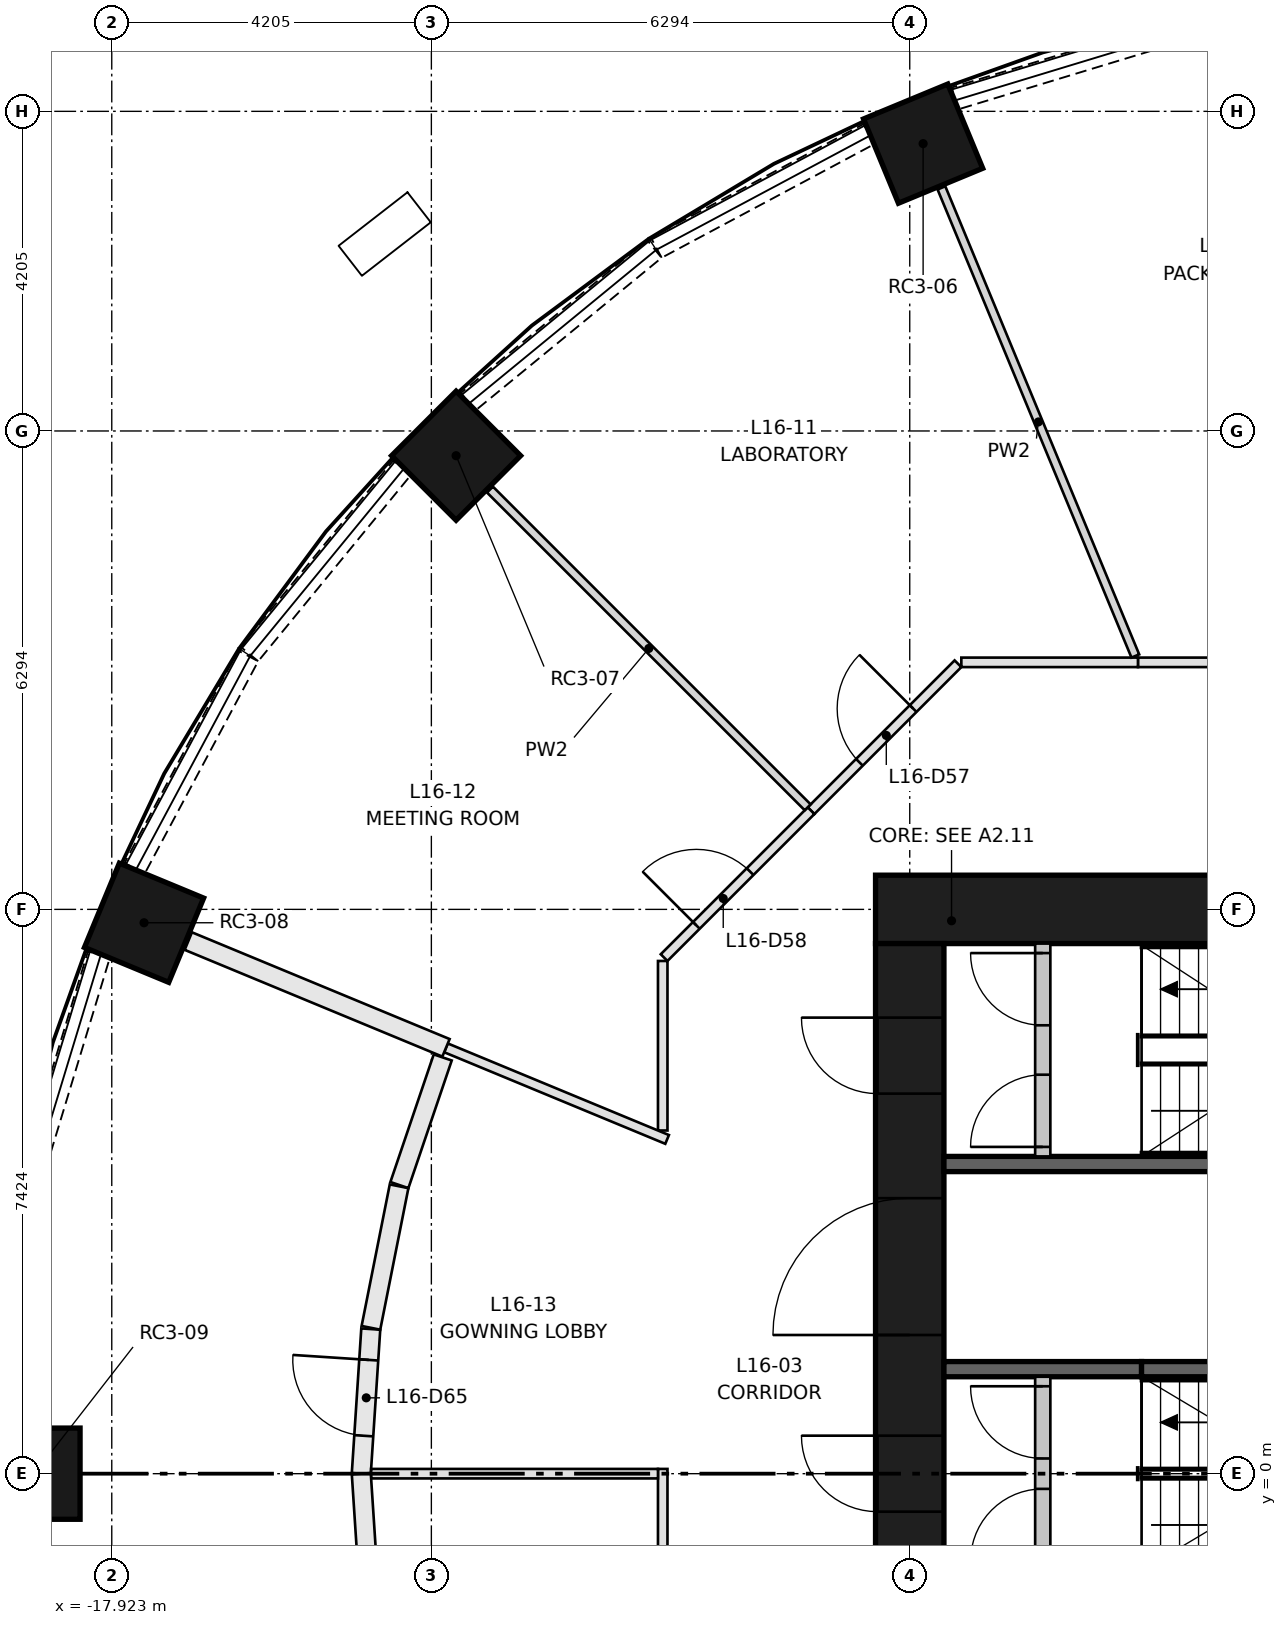
"""IFC4 building model, lengths in metres.
Left out: names, types, materials, properties, quantities, classifications, styles, units other than length and angle.
Written with IfcOpenShell. Run it as: python <this file> out.ifc"""

import sys

from ifc_helpers import new_model, si_unit, direction, frame, frame_2d, origin, origin_2d, place, context, subcontext, project, spatial, rectangle, extrude, element, fill, save


model = new_model("IFC4")
c1 = context("Model", 3, precision=1e-05, world=origin(), true_north=direction((0.0, 1.0)))
c2 = subcontext(c1, "Body", "Model", "MODEL_VIEW")
j1 = project(units=[si_unit("LENGTHUNIT", "METRE"), si_unit("PLANEANGLEUNIT", "RADIAN")], contexts=[c1])
p1 = place(None, origin())
s1 = spatial("IfcSite", under=j1, at=p1, CompositionType="ELEMENT")
p2 = place(p1, origin())
s2 = spatial("IfcBuilding", under=s1, at=p2, CompositionType="ELEMENT")
p3 = place(p2, frame((0.0, 0.0, 62.7)))
s3 = spatial("IfcBuildingStorey", under=s2, at=p3, CompositionType="ELEMENT", Elevation=62.7)
for number, where, z_axis, x_axis in (
    (1, (-7.248, 17.498, 0.0), (0.0, 0.0, 1.0), (-0.383, 0.924, 0.0)),
    (2, (-13.393, 13.393, 0.0), (0.0, 0.0, 1.0), (-0.707, 0.707, 0.0)),
    (3, (-17.498, 7.248, 0.0), (0.0, 0.0, 1.0), (-0.924, 0.383, 0.0)),
    (4, (-18.94, 0.0, 0.0), (0.0, 0.0, 1.0), (-1.0, 0.0, 0.0)),
):
    element("IfcColumn", number, at=place(p3, frame(where, z_axis=z_axis, x_axis=x_axis)), inside=s3, PredefinedType="COLUMN", context=c2, shape_type="SweptSolid", body=[
        extrude(rectangle(XDim=1.2, YDim=1.2, at=origin_2d()), origin(), (0.0, 0.0, 1.0), 3.65),
    ])
p4 = place(p3, frame((-7.874, 7.424, 0.0), z_axis=(0.0, 0.0, 1.0), x_axis=(1.0, 0.0, 0.0)))
e5 = element("IfcWall", 5, at=p4, inside=s3, PredefinedType="SHEAR", context=c2, shape_type="SweptSolid", body=[
    extrude(rectangle(XDim=15.748, YDim=0.9, at=frame_2d((7.874, 0.0))), origin(), (0.0, 0.0, 1.0), 3.65),
])
p5 = place(p3, frame((-7.424, -6.974, 0.0), z_axis=(0.0, 0.0, 1.0), x_axis=(0.0, 1.0, 0.0)))
e6 = element("IfcWall", 6, at=p5, inside=s3, PredefinedType="SHEAR", context=c2, shape_type="SweptSolid", body=[
    extrude(rectangle(XDim=13.948, YDim=0.9, at=frame_2d((6.974, 0.0))), origin(), (0.0, 0.0, 1.0), 3.65),
])
p6 = place(p5, frame((6.474, 0.0, 0.0)))
e7 = element("IfcOpeningElement", 7, at=p6, cuts=e6, PredefinedType="OPENING", context=c2, shape_type="SweptSolid", body=[
    extrude(rectangle(XDim=1.0, YDim=2.1, at=frame_2d((0.5, 1.05))), frame((0.0, 0.46, 0.0), z_axis=(0.0, -1.0, 0.0), x_axis=(1.0, 0.0, 0.0)), (0.0, 0.0, 1.0), 0.92),
])
p7 = place(p5, frame((3.35, 0.0, 0.0)))
e8 = element("IfcOpeningElement", 8, at=p7, cuts=e6, PredefinedType="OPENING", context=c2, shape_type="SweptSolid", body=[
    extrude(rectangle(XDim=1.8, YDim=2.1, at=frame_2d((0.9, 1.05))), frame((0.0, 0.46, 0.0), z_axis=(0.0, -1.0, 0.0), x_axis=(1.0, 0.0, 0.0)), (0.0, 0.0, 1.0), 0.92),
])
p8 = place(p5, frame((8.799, 0.0, 0.0)))
e9 = element("IfcOpeningElement", 9, at=p8, cuts=e6, PredefinedType="OPENING", context=c2, shape_type="SweptSolid", body=[
    extrude(rectangle(XDim=1.8, YDim=2.1, at=frame_2d((0.9, 1.05))), frame((0.0, 0.46, 0.0), z_axis=(0.0, -1.0, 0.0), x_axis=(1.0, 0.0, 0.0)), (0.0, 0.0, 1.0), 0.92),
])
p9 = place(p5, frame((11.974, 0.0, 0.0)))
e10 = element("IfcOpeningElement", 10, at=p9, cuts=e6, PredefinedType="OPENING", context=c2, shape_type="SweptSolid", body=[
    extrude(rectangle(XDim=1.0, YDim=2.1, at=frame_2d((0.5, 1.05))), frame((0.0, 0.46, 0.0), z_axis=(0.0, -1.0, 0.0), x_axis=(1.0, 0.0, 0.0)), (0.0, 0.0, 1.0), 0.92),
])
p10 = place(p3, frame((-6.974, 4.074, 0.0), z_axis=(0.0, 0.0, 1.0), x_axis=(1.0, 0.0, 0.0)))
e11 = element("IfcWall", 11, at=p10, inside=s3, PredefinedType="SHEAR", context=c2, shape_type="SweptSolid", body=[
    extrude(rectangle(XDim=6.974, YDim=0.2, at=frame_2d((3.487, 0.0))), origin(), (0.0, 0.0, 1.0), 3.3),
])
p11 = place(p3, frame((-6.974, 1.375, 0.0), z_axis=(0.0, 0.0, 1.0), x_axis=(1.0, 0.0, 0.0)))
e12 = element("IfcWall", 12, at=p11, inside=s3, PredefinedType="SHEAR", context=c2, shape_type="SweptSolid", body=[
    extrude(rectangle(XDim=2.6, YDim=0.2, at=frame_2d((1.3, 0.0))), origin(), (0.0, 0.0, 1.0), 3.3),
])
p12 = place(p3, frame((-4.374, 1.375, 0.0), z_axis=(0.0, 0.0, 1.0), x_axis=(1.0, 0.0, 0.0)))
e13 = element("IfcWall", 13, at=p12, inside=s3, PredefinedType="SHEAR", context=c2, shape_type="SweptSolid", body=[
    extrude(rectangle(XDim=4.374, YDim=0.2, at=frame_2d((2.187, 0.0))), origin(), (0.0, 0.0, 1.0), 3.3),
])
p13 = place(p3, frame((-5.674, -1.275, 0.0), z_axis=(0.0, 0.0, 1.0), x_axis=(0.0, 1.0, 0.0)))
e14 = element("IfcWall", 14, at=p13, inside=s3, PredefinedType="PARTITIONING", context=c2, shape_type="SweptSolid", body=[
    extrude(rectangle(XDim=2.55, YDim=0.2, at=frame_2d((1.275, 0.0))), origin(), (0.0, 0.0, 1.0), 3.3),
])
p14 = place(p13, frame((0.125, 0.0, 0.0)))
e15 = element("IfcOpeningElement", 15, at=p14, cuts=e14, PredefinedType="OPENING", context=c2, shape_type="SweptSolid", body=[
    extrude(rectangle(XDim=0.95, YDim=2.1, at=frame_2d((0.475, 1.05))), frame((0.0, 0.11, 0.0), z_axis=(0.0, -1.0, 0.0), x_axis=(1.0, 0.0, 0.0)), (0.0, 0.0, 1.0), 0.22),
])
p15 = place(p13, frame((1.475, 0.0, 0.0)))
e16 = element("IfcOpeningElement", 16, at=p15, cuts=e14, PredefinedType="OPENING", context=c2, shape_type="SweptSolid", body=[
    extrude(rectangle(XDim=0.95, YDim=2.1, at=frame_2d((0.475, 1.05))), frame((0.0, 0.11, 0.0), z_axis=(0.0, -1.0, 0.0), x_axis=(1.0, 0.0, 0.0)), (0.0, 0.0, 1.0), 0.22),
])
p16 = place(p3, frame((-5.674, 4.174, 0.0), z_axis=(0.0, 0.0, 1.0), x_axis=(0.0, 1.0, 0.0)))
e17 = element("IfcWall", 17, at=p16, inside=s3, PredefinedType="PARTITIONING", context=c2, shape_type="SweptSolid", body=[
    extrude(rectangle(XDim=2.8, YDim=0.2, at=frame_2d((1.4, 0.0))), origin(), (0.0, 0.0, 1.0), 3.3),
])
p17 = place(p16, frame((0.125, 0.0, 0.0)))
e18 = element("IfcOpeningElement", 18, at=p17, cuts=e17, PredefinedType="OPENING", context=c2, shape_type="SweptSolid", body=[
    extrude(rectangle(XDim=0.95, YDim=2.1, at=frame_2d((0.475, 1.05))), frame((0.0, 0.11, 0.0), z_axis=(0.0, -1.0, 0.0), x_axis=(1.0, 0.0, 0.0)), (0.0, 0.0, 1.0), 0.22),
])
p18 = place(p16, frame((1.725, 0.0, 0.0)))
e19 = element("IfcOpeningElement", 19, at=p18, cuts=e17, PredefinedType="OPENING", context=c2, shape_type="SweptSolid", body=[
    extrude(rectangle(XDim=0.95, YDim=2.1, at=frame_2d((0.475, 1.05))), frame((0.0, 0.11, 0.0), z_axis=(0.0, -1.0, 0.0), x_axis=(1.0, 0.0, 0.0)), (0.0, 0.0, 1.0), 0.22),
])
p19 = place(p3, frame((-3.797, 19.013, 0.0), z_axis=(0.0, 0.0, 1.0), x_axis=(-0.956888224489, -0.290456409527, 0.0)))
e20 = element("IfcWall", 20, at=p19, inside=s3, PredefinedType="SOLIDWALL", context=c2, shape_type="SweptSolid", body=[
    extrude(rectangle(XDim=3.169, YDim=0.3, at=frame_2d((1.584, 0.0))), origin(), (0.0, 0.0, 1.0), 0.9),
])
p20 = place(p3, frame((-7.963, 17.623, 0.0), z_axis=(0.0, 0.0, 1.0), x_axis=(-0.882007292685, -0.47123575379, 0.0)))
e21 = element("IfcWall", 21, at=p20, inside=s3, PredefinedType="SOLIDWALL", context=c2, shape_type="SweptSolid", body=[
    extrude(rectangle(XDim=3.17, YDim=0.3, at=frame_2d((1.585, 0.0))), origin(), (0.0, 0.0, 1.0), 0.9),
])
for number, where, z_axis, x_axis in (
    (22, (-10.784, 16.113, 0.0), (0.0, 0.0, 1.0), (-0.773, -0.634, 0.0)),
    (23, (-14.103, 13.234, 0.0), (0.0, 0.0, 1.0), (-0.634, -0.773, 0.0)),
):
    element("IfcWall", number, at=place(p3, frame(where, z_axis=z_axis, x_axis=x_axis)), inside=s3, PredefinedType="SOLIDWALL", context=c2, shape_type="SweptSolid", body=[
        extrude(rectangle(XDim=3.169, YDim=0.3, at=frame_2d((1.585, 0.0))), origin(), (0.0, 0.0, 1.0), 0.9),
    ])
p21 = place(p3, frame((-16.129, 10.759, 0.0), z_axis=(0.0, 0.0, 1.0), x_axis=(-0.47123575379, -0.882007292685, 0.0)))
e24 = element("IfcWall", 24, at=p21, inside=s3, PredefinedType="SOLIDWALL", context=c2, shape_type="SweptSolid", body=[
    extrude(rectangle(XDim=3.17, YDim=0.3, at=frame_2d((1.585, 0.0))), origin(), (0.0, 0.0, 1.0), 0.9),
])
p22 = place(p3, frame((-18.092, 6.83, 0.0), z_axis=(0.0, 0.0, 1.0), x_axis=(-0.290456409527, -0.956888224489, 0.0)))
e25 = element("IfcWall", 25, at=p22, inside=s3, PredefinedType="SOLIDWALL", context=c2, shape_type="SweptSolid", body=[
    extrude(rectangle(XDim=3.169, YDim=0.3, at=frame_2d((1.584, 0.0))), origin(), (0.0, 0.0, 1.0), 0.9),
])
p23 = place(p3, frame((-4.421, 10.674, 0.0), z_axis=(0.0, 0.0, 1.0), x_axis=(1.0, 0.0, 0.0)))
e26 = element("IfcWall", 26, at=p23, inside=s3, PredefinedType="PARTITIONING", context=c2, shape_type="SweptSolid", body=[
    extrude(rectangle(XDim=4.421, YDim=0.125, at=frame_2d((2.211, 0.0))), origin(), (0.0, 0.0, 1.0), 3.3),
])
p24 = place(p23, frame((1.7, 0.0, 0.0)))
e27 = element("IfcOpeningElement", 27, at=p24, cuts=e26, PredefinedType="OPENING", context=c2, shape_type="SweptSolid", body=[
    extrude(rectangle(XDim=1.0, YDim=2.1, at=frame_2d((0.5, 1.05))), frame((0.0, 0.073, 0.0), z_axis=(0.0, -1.0, 0.0), x_axis=(1.0, 0.0, 0.0)), (0.0, 0.0, 1.0), 0.145),
])
p25 = place(p3, frame((-8.722, 8.722, 0.0), z_axis=(0.0, 0.0, 1.0), x_axis=(0.707062130741, 0.707151428813, 0.0)))
e28 = element("IfcWall", 28, at=p25, inside=s3, PredefinedType="PARTITIONING", context=c2, shape_type="SweptSolid", body=[
    extrude(rectangle(XDim=2.734, YDim=0.125, at=frame_2d((1.367, 0.0))), origin(), (0.0, 0.0, 1.0), 3.3),
])
p26 = place(p25, frame((0.9, 0.0, 0.0)))
e29 = element("IfcOpeningElement", 29, at=p26, cuts=e28, PredefinedType="OPENING", context=c2, shape_type="SweptSolid", body=[
    extrude(rectangle(XDim=1.0, YDim=2.1, at=frame_2d((0.5, 1.05))), frame((0.0, 0.073, 0.0), z_axis=(0.0, -1.0, 0.0), x_axis=(1.0, 0.0, 0.0)), (0.0, 0.0, 1.0), 0.145),
])
p27 = place(p3, frame((-6.745, 10.674, 0.0), z_axis=(0.0, 0.0, 1.0), x_axis=(1.0, 0.0, 0.0)))
e30 = element("IfcWall", 30, at=p27, inside=s3, PredefinedType="PARTITIONING", context=c2, shape_type="SweptSolid", body=[
    extrude(rectangle(XDim=2.324, YDim=0.125, at=frame_2d((1.162, 0.0))), origin(), (0.0, 0.0, 1.0), 3.3),
])
p28 = place(p3, frame((-10.674, 4.515, 0.0), z_axis=(0.0, 0.0, 1.0), x_axis=(0.0, 1.0, 0.0)))
e31 = element("IfcWall", 31, at=p28, inside=s3, PredefinedType="PARTITIONING", context=c2, shape_type="SweptSolid", body=[
    extrude(rectangle(XDim=2.23, YDim=0.125, at=frame_2d((1.115, 0.0))), origin(), (0.0, 0.0, 1.0), 3.3),
])
p29 = place(p3, frame((-10.656, 6.789, 0.0), z_axis=(0.0, 0.0, 1.0), x_axis=(0.707151428813, 0.707062130741, 0.0)))
e32 = element("IfcWall", 32, at=p29, inside=s3, PredefinedType="PARTITIONING", context=c2, shape_type="SweptSolid", body=[
    extrude(rectangle(XDim=2.734, YDim=0.125, at=frame_2d((1.367, 0.0))), origin(), (0.0, 0.0, 1.0), 3.3),
])
p30 = place(p29, frame((0.6, 0.0, 0.0)))
e33 = element("IfcOpeningElement", 33, at=p30, cuts=e32, PredefinedType="OPENING", context=c2, shape_type="SweptSolid", body=[
    extrude(rectangle(XDim=1.0, YDim=2.1, at=frame_2d((0.5, 1.05))), frame((0.0, 0.073, 0.0), z_axis=(0.0, -1.0, 0.0), x_axis=(1.0, 0.0, 0.0)), (0.0, 0.0, 1.0), 0.145),
])
p31 = place(p3, frame((-10.674, -4.421, 0.0), z_axis=(0.0, 0.0, 1.0), x_axis=(0.0, 1.0, 0.0)))
e34 = element("IfcWall", 34, at=p31, inside=s3, PredefinedType="PARTITIONING", context=c2, shape_type="SweptSolid", body=[
    extrude(rectangle(XDim=4.484, YDim=0.125, at=frame_2d((2.242, 0.0))), origin(), (0.0, 0.0, 1.0), 3.3),
])
p32 = place(p31, frame((1.7, 0.0, 0.0)))
e35 = element("IfcOpeningElement", 35, at=p32, cuts=e34, PredefinedType="OPENING", context=c2, shape_type="SweptSolid", body=[
    extrude(rectangle(XDim=1.0, YDim=2.1, at=frame_2d((0.5, 1.05))), frame((0.0, 0.073, 0.0), z_axis=(0.0, -1.0, 0.0), x_axis=(1.0, 0.0, 0.0)), (0.0, 0.0, 1.0), 0.145),
])
p33 = place(p3, frame((-4.456, 10.758, 0.0), z_axis=(0.0, 0.0, 1.0), x_axis=(-0.382716213896, 0.923865953275, 0.0)))
e36 = element("IfcWall", 36, at=p33, inside=s3, PredefinedType="PARTITIONING", context=c2, shape_type="SweptSolid", body=[
    extrude(rectangle(XDim=6.666, YDim=0.11, at=frame_2d((3.333, 0.0))), origin(), (0.0, 0.0, 1.0), 3.3),
])
p34 = place(p3, frame((-8.767, 8.767, 0.0), z_axis=(0.0, 0.0, 1.0), x_axis=(-0.707106781187, 0.707106781187, 0.0)))
e37 = element("IfcWall", 37, at=p34, inside=s3, PredefinedType="PARTITIONING", context=c2, shape_type="SweptSolid", body=[
    extrude(rectangle(XDim=5.912, YDim=0.11, at=frame_2d((2.956, 0.0))), origin(), (0.0, 0.0, 1.0), 3.3),
])
p35 = place(p3, frame((-10.616, 4.397, 0.0), z_axis=(0.0, 0.0, 1.0), x_axis=(-0.923884549049, 0.382671321147, 0.0)))
e38 = element("IfcWall", 38, at=p35, inside=s3, PredefinedType="PARTITIONING", context=c2, shape_type="SweptSolid", body=[
    extrude(rectangle(XDim=3.149, YDim=0.125, at=frame_2d((1.575, 0.0))), origin(), (0.0, 0.0, 1.0), 3.3),
])
p36 = place(p3, frame((-13.526, 5.603, 0.0), z_axis=(0.0, 0.0, 1.0), x_axis=(-0.923870076355, 0.382706260748, 0.0)))
e39 = element("IfcWall", 39, at=p36, inside=s3, PredefinedType="PARTITIONING", context=c2, shape_type="SweptSolid", body=[
    extrude(rectangle(XDim=3.67, YDim=0.25, at=frame_2d((1.835, 0.0))), origin(), (0.0, 0.0, 1.0), 3.3),
])
p37 = place(p3, frame((-14.64, 0.0, 0.0), z_axis=(0.0, 0.0, 1.0), x_axis=(0.065303653727, 0.997865438228, 0.0)))
e40 = element("IfcWall", 40, at=p37, inside=s3, PredefinedType="PARTITIONING", context=c2, shape_type="SweptSolid", body=[
    extrude(rectangle(XDim=1.907, YDim=0.25, at=frame_2d((0.953, 0.0))), origin(), (0.0, 0.0, 1.0), 3.3),
])
p38 = place(p37, frame((0.5, 0.0, 0.0)))
e41 = element("IfcOpeningElement", 41, at=p38, cuts=e40, PredefinedType="OPENING", context=c2, shape_type="SweptSolid", body=[
    extrude(rectangle(XDim=1.0, YDim=2.1, at=frame_2d((0.5, 1.05))), frame((0.0, 0.135, 0.0), z_axis=(0.0, -1.0, 0.0), x_axis=(1.0, 0.0, 0.0)), (0.0, 0.0, 1.0), 0.27),
])
p39 = place(p3, frame((-14.513, 1.919, 0.0), z_axis=(0.0, 0.0, 1.0), x_axis=(0.195077379777, 0.980787854686, 0.0)))
e42 = element("IfcWall", 42, at=p39, inside=s3, PredefinedType="PARTITIONING", context=c2, shape_type="SweptSolid", body=[
    extrude(rectangle(XDim=1.898, YDim=0.25, at=frame_2d((0.949, 0.0))), origin(), (0.0, 0.0, 1.0), 3.3),
])
p40 = place(p3, frame((-14.139, 3.797, 0.0), z_axis=(0.0, 0.0, 1.0), x_axis=(0.321468303742, 0.946920339674, 0.0)))
e43 = element("IfcWall", 43, at=p40, inside=s3, PredefinedType="PARTITIONING", context=c2, shape_type="SweptSolid", body=[
    extrude(rectangle(XDim=1.773, YDim=0.25, at=frame_2d((0.887, 0.0))), origin(), (0.0, 0.0, 1.0), 3.3),
])
p41 = place(p3, frame((-10.737, 0.0, 0.0), z_axis=(0.0, 0.0, 1.0), x_axis=(-1.0, 0.0, 0.0)))
e44 = element("IfcWall", 44, at=p41, inside=s3, PredefinedType="PARTITIONING", context=c2, shape_type="SweptSolid", body=[
    extrude(rectangle(XDim=3.774, YDim=0.125, at=frame_2d((1.887, 0.0))), origin(), (0.0, 0.0, 1.0), 3.3),
])
p42 = place(p3, frame((-14.64, 0.0, 0.0), z_axis=(0.0, 0.0, 1.0), x_axis=(0.065303653727, -0.997865438228, 0.0)))
e45 = element("IfcWall", 45, at=p42, inside=s3, PredefinedType="PARTITIONING", context=c2, shape_type="SweptSolid", body=[
    extrude(rectangle(XDim=1.907, YDim=0.25, at=frame_2d((0.953, 0.0))), origin(), (0.0, 0.0, 1.0), 3.3),
])
p43 = place(p14, origin())
e46 = element("IfcDoor", 46, at=p43, inside=s3, OperationType="SINGLE_SWING_LEFT", PredefinedType="DOOR", context=c2, shape_type="SweptSolid", body=[
    extrude(rectangle(XDim=0.95, YDim=2.1, at=frame_2d((0.475, 1.05))), frame((0.0, 0.025, 0.0), z_axis=(0.0, -1.0, 0.0), x_axis=(1.0, 0.0, 0.0)), (0.0, 0.0, 1.0), 0.05),
])
fill(e15, e46)
p44 = place(p15, origin())
e47 = element("IfcDoor", 47, at=p44, inside=s3, OperationType="SINGLE_SWING_RIGHT", PredefinedType="DOOR", context=c2, shape_type="SweptSolid", body=[
    extrude(rectangle(XDim=0.95, YDim=2.1, at=frame_2d((0.475, 1.05))), frame((0.0, 0.025, 0.0), z_axis=(0.0, -1.0, 0.0), x_axis=(1.0, 0.0, 0.0)), (0.0, 0.0, 1.0), 0.05),
])
fill(e16, e47)
p45 = place(p17, origin())
e48 = element("IfcDoor", 48, at=p45, inside=s3, OperationType="SINGLE_SWING_LEFT", PredefinedType="DOOR", context=c2, shape_type="SweptSolid", body=[
    extrude(rectangle(XDim=0.95, YDim=2.1, at=frame_2d((0.475, 1.05))), frame((0.0, 0.025, 0.0), z_axis=(0.0, -1.0, 0.0), x_axis=(1.0, 0.0, 0.0)), (0.0, 0.0, 1.0), 0.05),
])
fill(e18, e48)
p46 = place(p18, origin())
e49 = element("IfcDoor", 49, at=p46, inside=s3, OperationType="SINGLE_SWING_RIGHT", PredefinedType="DOOR", context=c2, shape_type="SweptSolid", body=[
    extrude(rectangle(XDim=0.95, YDim=2.1, at=frame_2d((0.475, 1.05))), frame((0.0, 0.025, 0.0), z_axis=(0.0, -1.0, 0.0), x_axis=(1.0, 0.0, 0.0)), (0.0, 0.0, 1.0), 0.05),
])
fill(e19, e49)
p47 = place(p6, origin())
e50 = element("IfcDoor", 50, at=p47, inside=s3, OperationType="SINGLE_SWING_RIGHT", PredefinedType="DOOR", context=c2, shape_type="SweptSolid", body=[
    extrude(rectangle(XDim=1.0, YDim=2.1, at=frame_2d((0.5, 1.05))), frame((0.0, 0.45, 0.0), z_axis=(0.0, -1.0, 0.0), x_axis=(1.0, 0.0, 0.0)), (0.0, 0.0, 1.0), 0.05),
])
fill(e7, e50)
p48 = place(p8, origin())
e51 = element("IfcDoor", 51, at=p48, inside=s3, OperationType="DOUBLE_DOOR_SINGLE_SWING", PredefinedType="DOOR", context=c2, shape_type="SweptSolid", body=[
    extrude(rectangle(XDim=1.8, YDim=2.1, at=frame_2d((0.9, 1.05))), frame((0.0, 0.025, 0.0), z_axis=(0.0, -1.0, 0.0), x_axis=(1.0, 0.0, 0.0)), (0.0, 0.0, 1.0), 0.05),
])
fill(e9, e51)
p49 = place(p9, origin())
e52 = element("IfcDoor", 52, at=p49, inside=s3, OperationType="SINGLE_SWING_RIGHT", PredefinedType="DOOR", context=c2, shape_type="SweptSolid", body=[
    extrude(rectangle(XDim=1.0, YDim=2.1, at=frame_2d((0.5, 1.05))), frame((0.0, 0.45, 0.0), z_axis=(0.0, -1.0, 0.0), x_axis=(1.0, 0.0, 0.0)), (0.0, 0.0, 1.0), 0.05),
])
fill(e10, e52)
p50 = place(p26, origin())
e53 = element("IfcDoor", 53, at=p50, inside=s3, OperationType="SINGLE_SWING_RIGHT", PredefinedType="DOOR", context=c2, shape_type="SweptSolid", body=[
    extrude(rectangle(XDim=1.0, YDim=2.1, at=frame_2d((0.5, 1.05))), frame((0.0, 0.025, 0.0), z_axis=(0.0, -1.0, 0.0), x_axis=(1.0, 0.0, 0.0)), (0.0, 0.0, 1.0), 0.05),
])
fill(e29, e53)
p51 = place(p30, origin())
e54 = element("IfcDoor", 54, at=p51, inside=s3, OperationType="SINGLE_SWING_LEFT", PredefinedType="DOOR", context=c2, shape_type="SweptSolid", body=[
    extrude(rectangle(XDim=1.0, YDim=2.1, at=frame_2d((0.5, 1.05))), frame((0.0, 0.025, 0.0), z_axis=(0.0, -1.0, 0.0), x_axis=(1.0, 0.0, 0.0)), (0.0, 0.0, 1.0), 0.05),
])
fill(e33, e54)
p52 = place(p38, origin())
e55 = element("IfcDoor", 55, at=p52, inside=s3, OperationType="SINGLE_SWING_RIGHT", PredefinedType="DOOR", context=c2, shape_type="SweptSolid", body=[
    extrude(rectangle(XDim=1.0, YDim=2.1, at=frame_2d((0.5, 1.05))), frame((0.0, 0.025, 0.0), z_axis=(0.0, -1.0, 0.0), x_axis=(1.0, 0.0, 0.0)), (0.0, 0.0, 1.0), 0.05),
])
fill(e41, e55)
save(model, sys.argv[1])
